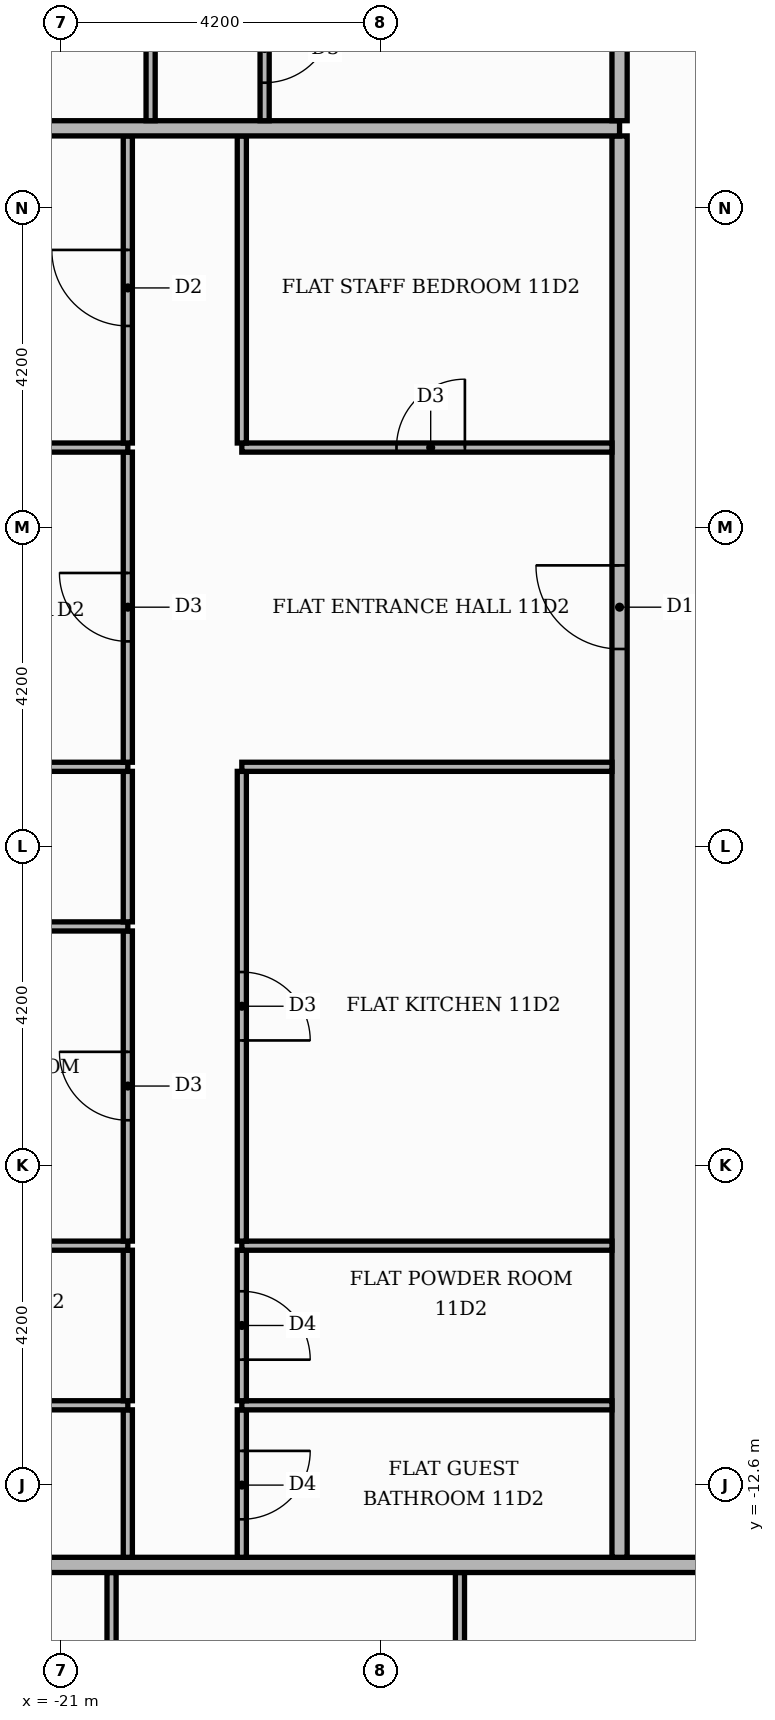
"""IFC4 building model, lengths in metres.
Left out: names, types, materials, properties, quantities, classifications, styles, units other than length and angle.
Written with IfcOpenShell. Run it as: python <this file> out.ifc"""

import sys

from ifc_helpers import new_model, si_unit, direction, frame, frame_2d, origin, place, context, subcontext, project, spatial, rectangle, extrude, element, fill, save


model = new_model("IFC4")
c1 = context("Model", 3, precision=1e-05, world=origin(), true_north=direction((0.0, 1.0)))
c2 = subcontext(c1, "Body", "Model", "MODEL_VIEW")
j1 = project(units=[si_unit("LENGTHUNIT", "METRE"), si_unit("PLANEANGLEUNIT", "RADIAN")], contexts=[c1])
p1 = place(None, origin())
s1 = spatial("IfcSite", under=j1, at=p1, CompositionType="ELEMENT")
p2 = place(p1, origin())
s2 = spatial("IfcBuilding", under=s1, at=p2, CompositionType="ELEMENT")
p3 = place(p2, frame((0.0, 0.0, 50.4)))
s3 = spatial("IfcBuildingStorey", under=s2, at=p3, CompositionType="ELEMENT", Elevation=50.4)
p4 = place(p3, frame((-20.334, -20.66, 0.0), z_axis=(0.0, 0.0, 1.0), x_axis=(0.0, 1.0, 0.0)))
e1 = element("IfcWall", 1, at=p4, inside=s3, PredefinedType="PARTITIONING", context=c2, shape_type="SweptSolid", body=[
    extrude(rectangle(XDim=6.91, YDim=0.12, at=frame_2d((3.455, 0.0))), origin(), (0.0, 0.0, 1.0), 3.48),
])
p5 = place(p4, frame((4.792, 0.0, 0.0)))
e2 = element("IfcOpeningElement", 2, at=p5, cuts=e1, PredefinedType="OPENING", context=c2, shape_type="SweptSolid", body=[
    extrude(rectangle(XDim=0.9, YDim=2.1, at=frame_2d((0.45, 1.05))), frame((0.0, 0.07, 0.0), z_axis=(0.0, -1.0, 0.0), x_axis=(1.0, 0.0, 0.0)), (0.0, 0.0, 1.0), 0.14),
])
p6 = place(p3, frame((-15.75, -20.66, 0.0), z_axis=(0.0, 0.0, 1.0), x_axis=(0.0, 1.0, 0.0)))
e3 = element("IfcWall", 3, at=p6, inside=s3, PredefinedType="PARTITIONING", context=c2, shape_type="SweptSolid", body=[
    extrude(rectangle(XDim=6.91, YDim=0.12, at=frame_2d((3.455, 0.0))), origin(), (0.0, 0.0, 1.0), 3.48),
])
p7 = place(p6, frame((2.975, 0.0, 0.0)))
e4 = element("IfcOpeningElement", 4, at=p7, cuts=e3, PredefinedType="OPENING", context=c2, shape_type="SweptSolid", body=[
    extrude(rectangle(XDim=1.0, YDim=2.1, at=frame_2d((0.5, 1.05))), frame((0.0, 0.07, 0.0), z_axis=(0.0, -1.0, 0.0), x_axis=(1.0, 0.0, 0.0)), (0.0, 0.0, 1.0), 0.14),
])
p8 = place(p3, frame((-25.42, -13.65, 0.0), z_axis=(0.0, 0.0, 1.0), x_axis=(1.0, 0.0, 0.0)))
e5 = element("IfcWall", 5, at=p8, inside=s3, PredefinedType="PARTITIONING", context=c2, shape_type="SweptSolid", body=[
    extrude(rectangle(XDim=39.07, YDim=0.2, at=frame_2d((19.535, 0.0))), origin(), (0.0, 0.0, 1.0), 3.48),
])
p9 = place(p8, frame((13.32, 0.0, 0.0)))
e6 = element("IfcOpeningElement", 6, at=p9, cuts=e5, PredefinedType="OPENING", context=c2, shape_type="SweptSolid", body=[
    extrude(rectangle(XDim=1.1, YDim=2.4, at=frame_2d((0.55, 1.2))), frame((0.0, 0.11, 0.0), z_axis=(0.0, -1.0, 0.0), x_axis=(1.0, 0.0, 0.0)), (0.0, 0.0, 1.0), 0.22),
])
p10 = place(p8, frame((25.92, 0.0, 0.0)))
e7 = element("IfcOpeningElement", 7, at=p10, cuts=e5, PredefinedType="OPENING", context=c2, shape_type="SweptSolid", body=[
    extrude(rectangle(XDim=1.1, YDim=2.4, at=frame_2d((0.55, 1.2))), frame((0.0, 0.11, 0.0), z_axis=(0.0, -1.0, 0.0), x_axis=(1.0, 0.0, 0.0)), (0.0, 0.0, 1.0), 0.22),
])
p11 = place(p3, frame((-20.12, -13.55, 0.0), z_axis=(0.0, 0.0, 1.0), x_axis=(0.0, 1.0, 0.0)))
e8 = element("IfcWall", 8, at=p11, inside=s3, PredefinedType="PARTITIONING", context=c2, shape_type="SweptSolid", body=[
    extrude(rectangle(XDim=1.94, YDim=0.12, at=frame_2d((0.97, 0.0))), origin(), (0.0, 0.0, 1.0), 3.48),
])
p12 = place(p3, frame((-18.62, -13.55, 0.0), z_axis=(0.0, 0.0, 1.0), x_axis=(0.0, 1.0, 0.0)))
e9 = element("IfcWall", 9, at=p12, inside=s3, PredefinedType="PARTITIONING", context=c2, shape_type="SweptSolid", body=[
    extrude(rectangle(XDim=1.94, YDim=0.12, at=frame_2d((0.97, 0.0))), origin(), (0.0, 0.0, 1.0), 3.48),
])
p13 = place(p12, frame((0.5, 0.0, 0.0)))
e10 = element("IfcOpeningElement", 10, at=p13, cuts=e9, PredefinedType="OPENING", context=c2, shape_type="SweptSolid", body=[
    extrude(rectangle(XDim=0.9, YDim=2.1, at=frame_2d((0.45, 1.05))), frame((0.0, 0.07, 0.0), z_axis=(0.0, -1.0, 0.0), x_axis=(1.0, 0.0, 0.0)), (0.0, 0.0, 1.0), 0.14),
])
p14 = place(p3, frame((-13.65, -13.55, 0.0), z_axis=(0.0, 0.0, 1.0), x_axis=(0.0, 1.0, 0.0)))
e11 = element("IfcWall", 11, at=p14, inside=s3, PredefinedType="PARTITIONING", context=c2, shape_type="SweptSolid", body=[
    extrude(rectangle(XDim=18.7, YDim=0.2, at=frame_2d((9.35, 0.0))), origin(), (0.0, 0.0, 1.0), 3.48),
])
p15 = place(p14, frame((11.95, 0.0, 0.0)))
e12 = element("IfcOpeningElement", 12, at=p15, cuts=e11, PredefinedType="OPENING", context=c2, shape_type="SweptSolid", body=[
    extrude(rectangle(XDim=1.1, YDim=2.4, at=frame_2d((0.55, 1.2))), frame((0.0, 0.11, 0.0), z_axis=(0.0, -1.0, 0.0), x_axis=(1.0, 0.0, 0.0)), (0.0, 0.0, 1.0), 0.22),
])
p16 = place(p3, frame((-25.42, -11.55, 0.0), z_axis=(0.0, 0.0, 1.0), x_axis=(1.0, 0.0, 0.0)))
e13 = element("IfcWall", 13, at=p16, inside=s3, PredefinedType="PARTITIONING", context=c2, shape_type="SweptSolid", body=[
    extrude(rectangle(XDim=5.3, YDim=0.12, at=frame_2d((2.65, 0.0))), origin(), (0.0, 0.0, 1.0), 3.48),
])
p17 = place(p16, frame((2.05, 0.0, 0.0)))
e14 = element("IfcOpeningElement", 14, at=p17, cuts=e13, PredefinedType="OPENING", context=c2, shape_type="SweptSolid", body=[
    extrude(rectangle(XDim=0.9, YDim=2.1, at=frame_2d((0.45, 1.05))), frame((0.0, 0.07, 0.0), z_axis=(0.0, -1.0, 0.0), x_axis=(1.0, 0.0, 0.0)), (0.0, 0.0, 1.0), 0.14),
])
p18 = place(p3, frame((-18.62, -11.55, 0.0), z_axis=(0.0, 0.0, 1.0), x_axis=(1.0, 0.0, 0.0)))
e15 = element("IfcWall", 15, at=p18, inside=s3, PredefinedType="PARTITIONING", context=c2, shape_type="SweptSolid", body=[
    extrude(rectangle(XDim=4.87, YDim=0.12, at=frame_2d((2.435, 0.0))), origin(), (0.0, 0.0, 1.0), 3.48),
])
p19 = place(p3, frame((-20.12, -11.49, 0.0), z_axis=(0.0, 0.0, 1.0), x_axis=(0.0, 1.0, 0.0)))
e16 = element("IfcWall", 16, at=p19, inside=s3, PredefinedType="PARTITIONING", context=c2, shape_type="SweptSolid", body=[
    extrude(rectangle(XDim=1.98, YDim=0.12, at=frame_2d((0.99, 0.0))), origin(), (0.0, 0.0, 1.0), 3.48),
])
p20 = place(p3, frame((-18.62, -11.49, 0.0), z_axis=(0.0, 0.0, 1.0), x_axis=(0.0, 1.0, 0.0)))
e17 = element("IfcWall", 17, at=p20, inside=s3, PredefinedType="PARTITIONING", context=c2, shape_type="SweptSolid", body=[
    extrude(rectangle(XDim=1.98, YDim=0.12, at=frame_2d((0.99, 0.0))), origin(), (0.0, 0.0, 1.0), 3.48),
])
p21 = place(p20, frame((0.54, 0.0, 0.0)))
e18 = element("IfcOpeningElement", 18, at=p21, cuts=e17, PredefinedType="OPENING", context=c2, shape_type="SweptSolid", body=[
    extrude(rectangle(XDim=0.9, YDim=2.1, at=frame_2d((0.45, 1.05))), frame((0.0, 0.07, 0.0), z_axis=(0.0, -1.0, 0.0), x_axis=(1.0, 0.0, 0.0)), (0.0, 0.0, 1.0), 0.14),
])
p22 = place(p3, frame((-25.42, -9.45, 0.0), z_axis=(0.0, 0.0, 1.0), x_axis=(1.0, 0.0, 0.0)))
e19 = element("IfcWall", 19, at=p22, inside=s3, PredefinedType="PARTITIONING", context=c2, shape_type="SweptSolid", body=[
    extrude(rectangle(XDim=5.3, YDim=0.12, at=frame_2d((2.65, 0.0))), origin(), (0.0, 0.0, 1.0), 3.48),
])
p23 = place(p22, frame((2.05, 0.0, 0.0)))
e20 = element("IfcOpeningElement", 20, at=p23, cuts=e19, PredefinedType="OPENING", context=c2, shape_type="SweptSolid", body=[
    extrude(rectangle(XDim=0.9, YDim=2.1, at=frame_2d((0.45, 1.05))), frame((0.0, 0.07, 0.0), z_axis=(0.0, -1.0, 0.0), x_axis=(1.0, 0.0, 0.0)), (0.0, 0.0, 1.0), 0.14),
])
p24 = place(p3, frame((-18.62, -9.45, 0.0), z_axis=(0.0, 0.0, 1.0), x_axis=(1.0, 0.0, 0.0)))
e21 = element("IfcWall", 21, at=p24, inside=s3, PredefinedType="PARTITIONING", context=c2, shape_type="SweptSolid", body=[
    extrude(rectangle(XDim=4.87, YDim=0.12, at=frame_2d((2.435, 0.0))), origin(), (0.0, 0.0, 1.0), 3.48),
])
p25 = place(p3, frame((-20.12, -9.39, 0.0), z_axis=(0.0, 0.0, 1.0), x_axis=(0.0, 1.0, 0.0)))
e22 = element("IfcWall", 22, at=p25, inside=s3, PredefinedType="PARTITIONING", context=c2, shape_type="SweptSolid", body=[
    extrude(rectangle(XDim=4.08, YDim=0.12, at=frame_2d((2.04, 0.0))), origin(), (0.0, 0.0, 1.0), 3.48),
])
p26 = place(p25, frame((1.59, 0.0, 0.0)))
e23 = element("IfcOpeningElement", 23, at=p26, cuts=e22, PredefinedType="OPENING", context=c2, shape_type="SweptSolid", body=[
    extrude(rectangle(XDim=0.9, YDim=2.1, at=frame_2d((0.45, 1.05))), frame((0.0, 0.07, 0.0), z_axis=(0.0, -1.0, 0.0), x_axis=(1.0, 0.0, 0.0)), (0.0, 0.0, 1.0), 0.14),
])
p27 = place(p3, frame((-18.62, -9.39, 0.0), z_axis=(0.0, 0.0, 1.0), x_axis=(0.0, 1.0, 0.0)))
e24 = element("IfcWall", 24, at=p27, inside=s3, PredefinedType="PARTITIONING", context=c2, shape_type="SweptSolid", body=[
    extrude(rectangle(XDim=6.18, YDim=0.12, at=frame_2d((3.09, 0.0))), origin(), (0.0, 0.0, 1.0), 3.48),
])
p28 = place(p27, frame((2.64, 0.0, 0.0)))
e25 = element("IfcOpeningElement", 25, at=p28, cuts=e24, PredefinedType="OPENING", context=c2, shape_type="SweptSolid", body=[
    extrude(rectangle(XDim=0.9, YDim=2.1, at=frame_2d((0.45, 1.05))), frame((0.0, 0.07, 0.0), z_axis=(0.0, -1.0, 0.0), x_axis=(1.0, 0.0, 0.0)), (0.0, 0.0, 1.0), 0.14),
])
p29 = place(p3, frame((-25.42, -5.25, 0.0), z_axis=(0.0, 0.0, 1.0), x_axis=(1.0, 0.0, 0.0)))
e26 = element("IfcWall", 26, at=p29, inside=s3, PredefinedType="PARTITIONING", context=c2, shape_type="SweptSolid", body=[
    extrude(rectangle(XDim=5.3, YDim=0.12, at=frame_2d((2.65, 0.0))), origin(), (0.0, 0.0, 1.0), 3.48),
])
p30 = place(p3, frame((-20.12, -5.19, 0.0), z_axis=(0.0, 0.0, 1.0), x_axis=(0.0, 1.0, 0.0)))
e27 = element("IfcWall", 27, at=p30, inside=s3, PredefinedType="PARTITIONING", context=c2, shape_type="SweptSolid", body=[
    extrude(rectangle(XDim=1.98, YDim=0.12, at=frame_2d((0.99, 0.0))), origin(), (0.0, 0.0, 1.0), 3.48),
])
p31 = place(p3, frame((-25.42, -3.15, 0.0), z_axis=(0.0, 0.0, 1.0), x_axis=(1.0, 0.0, 0.0)))
e28 = element("IfcWall", 28, at=p31, inside=s3, PredefinedType="PARTITIONING", context=c2, shape_type="SweptSolid", body=[
    extrude(rectangle(XDim=5.3, YDim=0.12, at=frame_2d((2.65, 0.0))), origin(), (0.0, 0.0, 1.0), 3.48),
])
p32 = place(p31, frame((2.05, 0.0, 0.0)))
e29 = element("IfcOpeningElement", 29, at=p32, cuts=e28, PredefinedType="OPENING", context=c2, shape_type="SweptSolid", body=[
    extrude(rectangle(XDim=0.9, YDim=2.1, at=frame_2d((0.45, 1.05))), frame((0.0, 0.07, 0.0), z_axis=(0.0, -1.0, 0.0), x_axis=(1.0, 0.0, 0.0)), (0.0, 0.0, 1.0), 0.14),
])
p33 = place(p3, frame((-18.62, -3.15, 0.0), z_axis=(0.0, 0.0, 1.0), x_axis=(1.0, 0.0, 0.0)))
e30 = element("IfcWall", 30, at=p33, inside=s3, PredefinedType="PARTITIONING", context=c2, shape_type="SweptSolid", body=[
    extrude(rectangle(XDim=4.87, YDim=0.12, at=frame_2d((2.435, 0.0))), origin(), (0.0, 0.0, 1.0), 3.48),
])
p34 = place(p3, frame((-20.12, -3.09, 0.0), z_axis=(0.0, 0.0, 1.0), x_axis=(0.0, 1.0, 0.0)))
e31 = element("IfcWall", 31, at=p34, inside=s3, PredefinedType="PARTITIONING", context=c2, shape_type="SweptSolid", body=[
    extrude(rectangle(XDim=4.08, YDim=0.12, at=frame_2d((2.04, 0.0))), origin(), (0.0, 0.0, 1.0), 3.48),
])
p35 = place(p34, frame((1.59, 0.0, 0.0)))
e32 = element("IfcOpeningElement", 32, at=p35, cuts=e31, PredefinedType="OPENING", context=c2, shape_type="SweptSolid", body=[
    extrude(rectangle(XDim=0.9, YDim=2.1, at=frame_2d((0.45, 1.05))), frame((0.0, 0.07, 0.0), z_axis=(0.0, -1.0, 0.0), x_axis=(1.0, 0.0, 0.0)), (0.0, 0.0, 1.0), 0.14),
])
p36 = place(p3, frame((-25.42, 1.05, 0.0), z_axis=(0.0, 0.0, 1.0), x_axis=(1.0, 0.0, 0.0)))
e33 = element("IfcWall", 33, at=p36, inside=s3, PredefinedType="PARTITIONING", context=c2, shape_type="SweptSolid", body=[
    extrude(rectangle(XDim=5.3, YDim=0.12, at=frame_2d((2.65, 0.0))), origin(), (0.0, 0.0, 1.0), 3.48),
])
p37 = place(p3, frame((-18.62, 1.05, 0.0), z_axis=(0.0, 0.0, 1.0), x_axis=(1.0, 0.0, 0.0)))
e34 = element("IfcWall", 34, at=p37, inside=s3, PredefinedType="PARTITIONING", context=c2, shape_type="SweptSolid", body=[
    extrude(rectangle(XDim=4.87, YDim=0.12, at=frame_2d((2.435, 0.0))), origin(), (0.0, 0.0, 1.0), 3.48),
])
p38 = place(p37, frame((2.035, 0.0, 0.0)))
e35 = element("IfcOpeningElement", 35, at=p38, cuts=e34, PredefinedType="OPENING", context=c2, shape_type="SweptSolid", body=[
    extrude(rectangle(XDim=0.9, YDim=2.1, at=frame_2d((0.45, 1.05))), frame((0.0, 0.07, 0.0), z_axis=(0.0, -1.0, 0.0), x_axis=(1.0, 0.0, 0.0)), (0.0, 0.0, 1.0), 0.14),
])
p39 = place(p3, frame((-20.12, 1.11, 0.0), z_axis=(0.0, 0.0, 1.0), x_axis=(0.0, 1.0, 0.0)))
e36 = element("IfcWall", 36, at=p39, inside=s3, PredefinedType="PARTITIONING", context=c2, shape_type="SweptSolid", body=[
    extrude(rectangle(XDim=4.04, YDim=0.12, at=frame_2d((2.02, 0.0))), origin(), (0.0, 0.0, 1.0), 3.48),
])
p40 = place(p39, frame((1.54, 0.0, 0.0)))
e37 = element("IfcOpeningElement", 37, at=p40, cuts=e36, PredefinedType="OPENING", context=c2, shape_type="SweptSolid", body=[
    extrude(rectangle(XDim=1.0, YDim=2.1, at=frame_2d((0.5, 1.05))), frame((0.0, 0.07, 0.0), z_axis=(0.0, -1.0, 0.0), x_axis=(1.0, 0.0, 0.0)), (0.0, 0.0, 1.0), 0.14),
])
p41 = place(p3, frame((-18.62, 1.11, 0.0), z_axis=(0.0, 0.0, 1.0), x_axis=(0.0, 1.0, 0.0)))
e38 = element("IfcWall", 38, at=p41, inside=s3, PredefinedType="PARTITIONING", context=c2, shape_type="SweptSolid", body=[
    extrude(rectangle(XDim=4.04, YDim=0.12, at=frame_2d((2.02, 0.0))), origin(), (0.0, 0.0, 1.0), 3.48),
])
p42 = place(p3, frame((-25.42, 5.25, 0.0), z_axis=(0.0, 0.0, 1.0), x_axis=(1.0, 0.0, 0.0)))
e39 = element("IfcWall", 39, at=p42, inside=s3, PredefinedType="PARTITIONING", context=c2, shape_type="SweptSolid", body=[
    extrude(rectangle(XDim=11.77, YDim=0.2, at=frame_2d((5.885, 0.0))), origin(), (0.0, 0.0, 1.0), 3.48),
])
p43 = place(p3, frame((-19.82, 5.35, 0.0), z_axis=(0.0, 0.0, 1.0), x_axis=(0.0, 1.0, 0.0)))
e40 = element("IfcWall", 40, at=p43, inside=s3, PredefinedType="PARTITIONING", context=c2, shape_type="SweptSolid", body=[
    extrude(rectangle(XDim=1.94, YDim=0.12, at=frame_2d((0.97, 0.0))), origin(), (0.0, 0.0, 1.0), 3.48),
])
p44 = place(p3, frame((-18.32, 5.35, 0.0), z_axis=(0.0, 0.0, 1.0), x_axis=(0.0, 1.0, 0.0)))
e41 = element("IfcWall", 41, at=p44, inside=s3, PredefinedType="PARTITIONING", context=c2, shape_type="SweptSolid", body=[
    extrude(rectangle(XDim=1.94, YDim=0.12, at=frame_2d((0.97, 0.0))), origin(), (0.0, 0.0, 1.0), 3.48),
])
p45 = place(p44, frame((0.5, 0.0, 0.0)))
e42 = element("IfcOpeningElement", 42, at=p45, cuts=e41, PredefinedType="OPENING", context=c2, shape_type="SweptSolid", body=[
    extrude(rectangle(XDim=0.9, YDim=2.1, at=frame_2d((0.45, 1.05))), frame((0.0, 0.07, 0.0), z_axis=(0.0, -1.0, 0.0), x_axis=(1.0, 0.0, 0.0)), (0.0, 0.0, 1.0), 0.14),
])
p46 = place(p3, frame((-13.65, 5.35, 0.0), z_axis=(0.0, 0.0, 1.0), x_axis=(0.0, 1.0, 0.0)))
e43 = element("IfcWall", 43, at=p46, inside=s3, PredefinedType="PARTITIONING", context=c2, shape_type="SweptSolid", body=[
    extrude(rectangle(XDim=8.2, YDim=0.2, at=frame_2d((4.1, 0.0))), origin(), (0.0, 0.0, 1.0), 3.48),
])
p47 = place(p46, frame((5.65, 0.0, 0.0)))
e44 = element("IfcOpeningElement", 44, at=p47, cuts=e43, PredefinedType="OPENING", context=c2, shape_type="SweptSolid", body=[
    extrude(rectangle(XDim=1.1, YDim=2.4, at=frame_2d((0.55, 1.2))), frame((0.0, 0.11, 0.0), z_axis=(0.0, -1.0, 0.0), x_axis=(1.0, 0.0, 0.0)), (0.0, 0.0, 1.0), 0.22),
])
p48 = place(p45, frame((0.9, 0.0, 0.0), z_axis=(0.0, 0.0, 1.0), x_axis=(-1.0, 0.0, 0.0)))
e45 = element("IfcDoor", 45, at=p48, inside=s3, OperationType="SINGLE_SWING_RIGHT", PredefinedType="DOOR", context=c2, shape_type="SweptSolid", body=[
    extrude(rectangle(XDim=0.9, YDim=2.1, at=frame_2d((0.45, 1.05))), frame((0.0, 0.025, 0.0), z_axis=(0.0, -1.0, 0.0), x_axis=(1.0, 0.0, 0.0)), (0.0, 0.0, 1.0), 0.05),
])
fill(e42, e45)
p49 = place(p15, origin())
e46 = element("IfcDoor", 46, at=p49, inside=s3, OperationType="SINGLE_SWING_RIGHT", PredefinedType="DOOR", context=c2, shape_type="SweptSolid", body=[
    extrude(rectangle(XDim=1.1, YDim=2.4, at=frame_2d((0.55, 1.2))), frame((0.0, 0.025, 0.0), z_axis=(0.0, -1.0, 0.0), x_axis=(1.0, 0.0, 0.0)), (0.0, 0.0, 1.0), 0.05),
])
fill(e12, e46)
p50 = place(p38, origin())
e47 = element("IfcDoor", 47, at=p50, inside=s3, OperationType="SINGLE_SWING_RIGHT", PredefinedType="DOOR", context=c2, shape_type="SweptSolid", body=[
    extrude(rectangle(XDim=0.9, YDim=2.1, at=frame_2d((0.45, 1.05))), frame((0.0, 0.025, 0.0), z_axis=(0.0, -1.0, 0.0), x_axis=(1.0, 0.0, 0.0)), (0.0, 0.0, 1.0), 0.05),
])
fill(e35, e47)
p51 = place(p28, frame((0.9, 0.0, 0.0), z_axis=(0.0, 0.0, 1.0), x_axis=(-1.0, 0.0, 0.0)))
e48 = element("IfcDoor", 48, at=p51, inside=s3, OperationType="SINGLE_SWING_LEFT", PredefinedType="DOOR", context=c2, shape_type="SweptSolid", body=[
    extrude(rectangle(XDim=0.9, YDim=2.1, at=frame_2d((0.45, 1.05))), frame((0.0, 0.025, 0.0), z_axis=(0.0, -1.0, 0.0), x_axis=(1.0, 0.0, 0.0)), (0.0, 0.0, 1.0), 0.05),
])
fill(e25, e48)
p52 = place(p21, frame((0.9, 0.0, 0.0), z_axis=(0.0, 0.0, 1.0), x_axis=(-1.0, 0.0, 0.0)))
e49 = element("IfcDoor", 49, at=p52, inside=s3, OperationType="SINGLE_SWING_LEFT", PredefinedType="DOOR", context=c2, shape_type="SweptSolid", body=[
    extrude(rectangle(XDim=0.9, YDim=2.1, at=frame_2d((0.45, 1.05))), frame((0.0, 0.025, 0.0), z_axis=(0.0, -1.0, 0.0), x_axis=(1.0, 0.0, 0.0)), (0.0, 0.0, 1.0), 0.05),
])
fill(e18, e49)
p53 = place(p13, frame((0.9, 0.0, 0.0), z_axis=(0.0, 0.0, 1.0), x_axis=(-1.0, 0.0, 0.0)))
e50 = element("IfcDoor", 50, at=p53, inside=s3, OperationType="SINGLE_SWING_RIGHT", PredefinedType="DOOR", context=c2, shape_type="SweptSolid", body=[
    extrude(rectangle(XDim=0.9, YDim=2.1, at=frame_2d((0.45, 1.05))), frame((0.0, 0.025, 0.0), z_axis=(0.0, -1.0, 0.0), x_axis=(1.0, 0.0, 0.0)), (0.0, 0.0, 1.0), 0.05),
])
fill(e10, e50)
p54 = place(p40, origin())
e51 = element("IfcDoor", 51, at=p54, inside=s3, OperationType="SINGLE_SWING_RIGHT", PredefinedType="DOOR", context=c2, shape_type="SweptSolid", body=[
    extrude(rectangle(XDim=1.0, YDim=2.1, at=frame_2d((0.5, 1.05))), frame((0.0, 0.025, 0.0), z_axis=(0.0, -1.0, 0.0), x_axis=(1.0, 0.0, 0.0)), (0.0, 0.0, 1.0), 0.05),
])
fill(e37, e51)
p55 = place(p35, origin())
e52 = element("IfcDoor", 52, at=p55, inside=s3, OperationType="SINGLE_SWING_RIGHT", PredefinedType="DOOR", context=c2, shape_type="SweptSolid", body=[
    extrude(rectangle(XDim=0.9, YDim=2.1, at=frame_2d((0.45, 1.05))), frame((0.0, 0.025, 0.0), z_axis=(0.0, -1.0, 0.0), x_axis=(1.0, 0.0, 0.0)), (0.0, 0.0, 1.0), 0.05),
])
fill(e32, e52)
p56 = place(p26, origin())
e53 = element("IfcDoor", 53, at=p56, inside=s3, OperationType="SINGLE_SWING_RIGHT", PredefinedType="DOOR", context=c2, shape_type="SweptSolid", body=[
    extrude(rectangle(XDim=0.9, YDim=2.1, at=frame_2d((0.45, 1.05))), frame((0.0, 0.025, 0.0), z_axis=(0.0, -1.0, 0.0), x_axis=(1.0, 0.0, 0.0)), (0.0, 0.0, 1.0), 0.05),
])
fill(e23, e53)
save(model, sys.argv[1])
